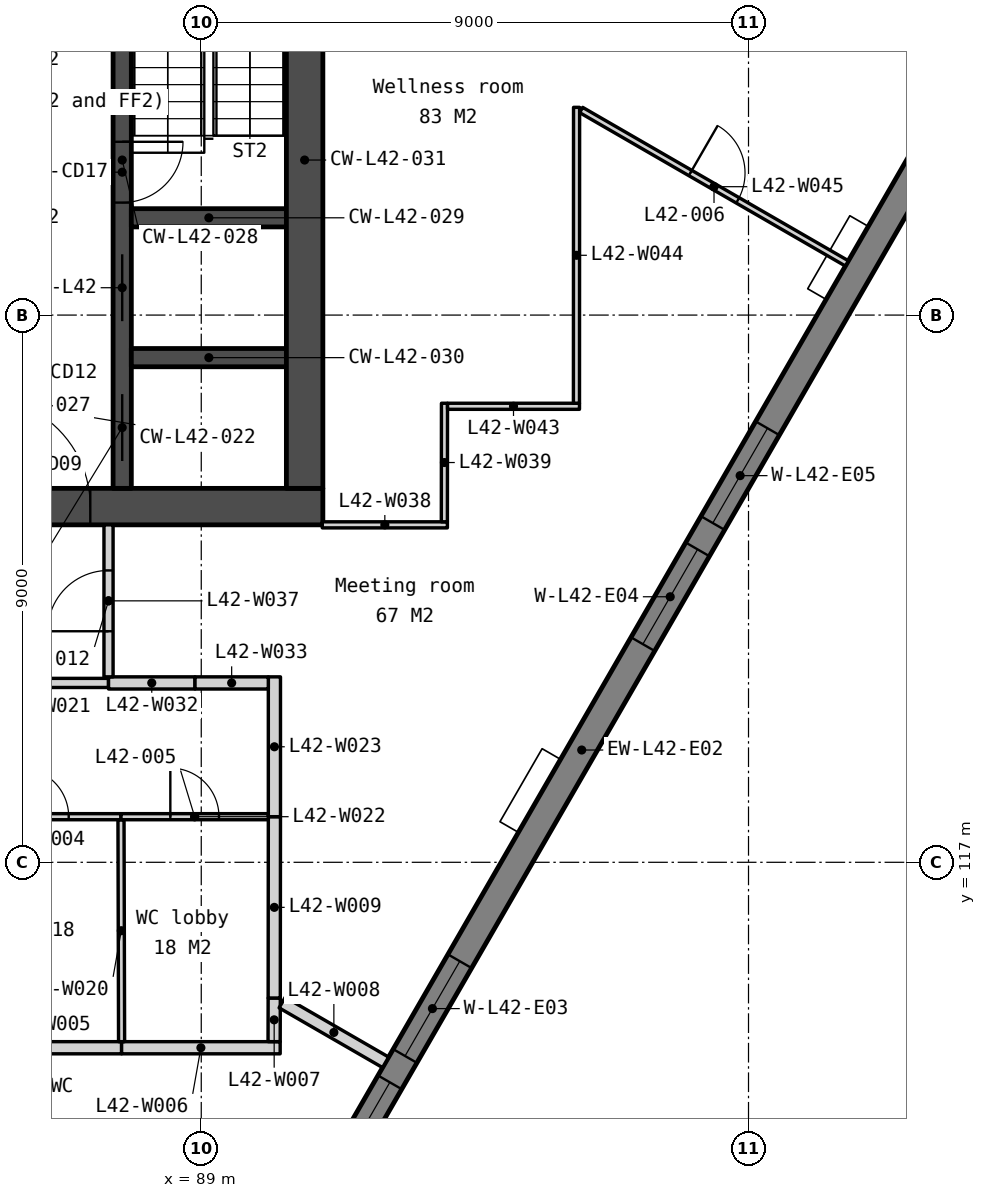
"""IFC4 building model, lengths in metres.
Left out: names, types, materials, properties, quantities, classifications, styles, units other than length and angle.
Written with IfcOpenShell. Run it as: python <this file> out.ifc"""

import sys

from ifc_helpers import new_model, si_unit, direction, frame, frame_2d, origin, place, context, subcontext, project, spatial, polyline, rectangle, outline, extrude, element, fill, save


model = new_model("IFC4")
c1 = context("Model", 3, precision=1e-05, world=origin(), true_north=direction((0.0, 1.0)))
c2 = subcontext(c1, "Body", "Model", "MODEL_VIEW")
j1 = project(units=[si_unit("LENGTHUNIT", "METRE"), si_unit("PLANEANGLEUNIT", "RADIAN")], contexts=[c1])
p1 = place(None, origin())
s1 = spatial("IfcSite", under=j1, at=p1, CompositionType="ELEMENT")
p2 = place(p1, origin())
s2 = spatial("IfcBuilding", under=s1, at=p2, CompositionType="ELEMENT")
p3 = place(p2, frame((0.0, 0.0, 167.6)))
s3 = spatial("IfcBuildingStorey", under=s2, at=p3, CompositionType="ELEMENT", Elevation=167.6)
p4 = place(p3, frame((69.0, 122.85, 0.0), z_axis=(0.0, 0.0, 1.0), x_axis=(1.0, 0.0, 0.0)))
e1 = element("IfcWall", 1, at=p4, inside=s3, PredefinedType="SOLIDWALL", context=c2, shape_type="SweptSolid", body=[
    extrude(rectangle(XDim=22.0, YDim=0.6, at=frame_2d((11.0, 0.0))), origin(), (0.0, 0.0, 1.0), 3.75),
])
p5 = place(p4, frame((16.375, 0.0, 0.0)))
e2 = element("IfcOpeningElement", 2, at=p5, cuts=e1, PredefinedType="OPENING", context=c2, shape_type="SweptSolid", body=[
    extrude(rectangle(XDim=1.8, YDim=2.1, at=frame_2d((0.9, 1.05))), frame((0.0, 0.31, 0.0), z_axis=(0.0, -1.0, 0.0), x_axis=(1.0, 0.0, 0.0)), (0.0, 0.0, 1.0), 0.62),
])
p6 = place(p4, frame((3.825, 0.0, 0.0)))
e3 = element("IfcOpeningElement", 3, at=p6, cuts=e1, PredefinedType="OPENING", context=c2, shape_type="SweptSolid", body=[
    extrude(rectangle(XDim=1.8, YDim=2.1, at=frame_2d((0.9, 1.05))), frame((0.0, 0.31, 0.0), z_axis=(0.0, -1.0, 0.0), x_axis=(1.0, 0.0, 0.0)), (0.0, 0.0, 1.0), 0.62),
])
p7 = place(p4, frame((12.85, 0.0, 0.0)))
e4 = element("IfcOpeningElement", 4, at=p7, cuts=e1, PredefinedType="OPENING", context=c2, shape_type="SweptSolid", body=[
    extrude(rectangle(XDim=1.5, YDim=2.1, at=frame_2d((0.75, 1.05))), frame((0.0, 0.31, 0.0), z_axis=(0.0, -1.0, 0.0), x_axis=(1.0, 0.0, 0.0)), (0.0, 0.0, 1.0), 0.62),
])
p8 = place(p3, frame((87.7, 133.95, 0.0), z_axis=(0.0, 0.0, 1.0), x_axis=(0.0, -1.0, 0.0)))
e5 = element("IfcWall", 5, at=p8, inside=s3, PredefinedType="SOLIDWALL", context=c2, shape_type="SweptSolid", body=[
    extrude(rectangle(XDim=10.8, YDim=0.3, at=frame_2d((5.4, 0.0))), origin(), (0.0, 0.0, 1.0), 3.75),
])
p9 = place(p8, frame((6.95, 0.0, 0.0)))
e6 = element("IfcOpeningElement", 6, at=p9, cuts=e5, PredefinedType="OPENING", context=c2, shape_type="SweptSolid", body=[
    extrude(rectangle(XDim=1.1, YDim=2.1, at=frame_2d((0.55, 1.05))), frame((0.0, 0.16, 0.0), z_axis=(0.0, -1.0, 0.0), x_axis=(1.0, 0.0, 0.0)), (0.0, 0.0, 1.0), 0.32),
])
p10 = place(p8, frame((5.1, 0.0, 0.0)))
e7 = element("IfcOpeningElement", 7, at=p10, cuts=e5, PredefinedType="OPENING", context=c2, shape_type="SweptSolid", body=[
    extrude(rectangle(XDim=1.0, YDim=2.1, at=frame_2d((0.5, 1.05))), frame((0.0, 0.16, 0.0), z_axis=(0.0, -1.0, 0.0), x_axis=(1.0, 0.0, 0.0)), (0.0, 0.0, 1.0), 0.32),
])
p11 = place(p8, frame((9.25, 0.0, 0.0)))
e8 = element("IfcOpeningElement", 8, at=p11, cuts=e5, PredefinedType="OPENING", context=c2, shape_type="SweptSolid", body=[
    extrude(rectangle(XDim=1.1, YDim=2.1, at=frame_2d((0.55, 1.05))), frame((0.0, 0.16, 0.0), z_axis=(0.0, -1.0, 0.0), x_axis=(1.0, 0.0, 0.0)), (0.0, 0.0, 1.0), 0.32),
])
for number, where, z_axis, x_axis in (
    (9, (87.85, 127.6, 0.0), (0.0, 0.0, 1.0), (1.0, 0.0, 0.0)),
    (10, (87.85, 125.3, 0.0), (0.0, 0.0, 1.0), (1.0, 0.0, 0.0)),
):
    element("IfcWall", number, at=place(p3, frame(where, z_axis=z_axis, x_axis=x_axis)), inside=s3, PredefinedType="SOLIDWALL", context=c2, shape_type="SweptSolid", body=[
        extrude(rectangle(XDim=2.55, YDim=0.3, at=frame_2d((1.275, 0.0))), origin(), (0.0, 0.0, 1.0), 3.75),
    ])
p12 = place(p3, frame((90.7, 133.95, 0.0), z_axis=(0.0, 0.0, 1.0), x_axis=(0.0, -1.0, 0.0)))
e11 = element("IfcWall", 11, at=p12, inside=s3, PredefinedType="SOLIDWALL", context=c2, shape_type="SweptSolid", body=[
    extrude(rectangle(XDim=10.8, YDim=0.6, at=frame_2d((5.4, 0.0))), origin(), (0.0, 0.0, 1.0), 3.75),
])
p13 = place(p3, frame((88.166, 106.564, -0.15), z_axis=(0.0, 0.0, 1.0), x_axis=(0.499995644604, 0.866027918359, 0.0)))
e12 = element("IfcWall", 12, at=p13, inside=s3, PredefinedType="SOLIDWALL", context=c2, shape_type="SweptSolid", body=[
    extrude(outline(polyline([(28.365, 3.9), (28.365, 0.0), (0.0, 0.0), (0.0, 3.9), (28.365, 3.9)])), frame((0.0, 0.225, 0.0), z_axis=(0.0, -1.0, 0.0), x_axis=(1.0, 0.0, 0.0)), (0.0, 0.0, 1.0), 0.45),
])
p14 = place(p13, frame((6.072, 0.0, 0.95)))
e13 = element("IfcOpeningElement", 13, at=p14, cuts=e12, PredefinedType="OPENING", context=c2, shape_type="SweptSolid", body=[
    extrude(rectangle(XDim=1.8, YDim=2.2, at=frame_2d((0.9, 1.1))), frame((0.0, 0.235, 0.0), z_axis=(0.0, -1.0, 0.0), x_axis=(1.0, 0.0, 0.0)), (0.0, 0.0, 1.0), 0.47),
])
p15 = place(p13, frame((8.372, 0.0, 0.95)))
e14 = element("IfcOpeningElement", 14, at=p15, cuts=e12, PredefinedType="OPENING", context=c2, shape_type="SweptSolid", body=[
    extrude(rectangle(XDim=1.8, YDim=2.2, at=frame_2d((0.9, 1.1))), frame((0.0, 0.235, 0.0), z_axis=(0.0, -1.0, 0.0), x_axis=(1.0, 0.0, 0.0)), (0.0, 0.0, 1.0), 0.47),
])
p16 = place(p13, frame((16.193, 0.0, 0.95)))
e15 = element("IfcOpeningElement", 15, at=p16, cuts=e12, PredefinedType="OPENING", context=c2, shape_type="SweptSolid", body=[
    extrude(rectangle(XDim=1.8, YDim=2.2, at=frame_2d((0.9, 1.1))), frame((0.0, 0.235, 0.0), z_axis=(0.0, -1.0, 0.0), x_axis=(1.0, 0.0, 0.0)), (0.0, 0.0, 1.0), 0.47),
])
p17 = place(p13, frame((18.493, 0.0, 0.95)))
e16 = element("IfcOpeningElement", 16, at=p17, cuts=e12, PredefinedType="OPENING", context=c2, shape_type="SweptSolid", body=[
    extrude(rectangle(XDim=1.8, YDim=2.2, at=frame_2d((0.9, 1.1))), frame((0.0, 0.235, 0.0), z_axis=(0.0, -1.0, 0.0), x_axis=(1.0, 0.0, 0.0)), (0.0, 0.0, 1.0), 0.47),
])
p18 = place(p13, frame((26.295, 0.0, 0.95)))
e17 = element("IfcOpeningElement", 17, at=p18, cuts=e12, PredefinedType="OPENING", context=c2, shape_type="SweptSolid", body=[
    extrude(rectangle(XDim=1.2, YDim=2.2, at=frame_2d((0.6, 1.1))), frame((0.0, 0.235, 0.0), z_axis=(0.0, -1.0, 0.0), x_axis=(1.0, 0.0, 0.0)), (0.0, 0.0, 1.0), 0.47),
])
p19 = place(p3, frame((85.15, 113.95, 0.0), z_axis=(0.0, 0.0, 1.0), x_axis=(1.0, 0.0, 0.0)))
e18 = element("IfcWall", 18, at=p19, inside=s3, PredefinedType="PARTITIONING", context=c2, shape_type="SweptSolid", body=[
    extrude(rectangle(XDim=2.54, YDim=0.2, at=frame_2d((1.27, 0.0))), origin(), (0.0, 0.0, 1.0), 3.75),
])
p20 = place(p3, frame((87.69, 113.95, 0.0), z_axis=(0.0, 0.0, 1.0), x_axis=(1.0, 0.0, 0.0)))
e19 = element("IfcWall", 19, at=p20, inside=s3, PredefinedType="PARTITIONING", context=c2, shape_type="SweptSolid", body=[
    extrude(rectangle(XDim=2.608, YDim=0.2, at=frame_2d((1.304, 0.0))), origin(), (0.0, 0.0, 1.0), 3.75),
])
p21 = place(p3, frame((90.198, 114.05, 0.0), z_axis=(0.0, 0.0, 1.0), x_axis=(0.002380945632, 0.999997165545, 0.0)))
e20 = element("IfcWall", 20, at=p21, inside=s3, PredefinedType="PARTITIONING", context=c2, shape_type="SweptSolid", body=[
    extrude(rectangle(XDim=0.718, YDim=0.2, at=frame_2d((0.359, 0.0))), origin(), (0.0, 0.0, 1.0), 3.75),
])
p22 = place(p3, frame((90.33, 114.693, 0.0), z_axis=(0.0, 0.0, 1.0), x_axis=(0.866009734793, -0.500027138508, 0.0)))
e21 = element("IfcWall", 21, at=p22, inside=s3, PredefinedType="PARTITIONING", context=c2, shape_type="SweptSolid", body=[
    extrude(rectangle(XDim=1.965, YDim=0.2, at=frame_2d((0.983, 0.0))), origin(), (0.0, 0.0, 1.0), 3.75),
])
p23 = place(p3, frame((90.2, 114.768, 0.0), z_axis=(0.0, 0.0, 1.0), x_axis=(0.000982398216, 0.999999517447, 0.0)))
e22 = element("IfcWall", 22, at=p23, inside=s3, PredefinedType="PARTITIONING", context=c2, shape_type="SweptSolid", body=[
    extrude(rectangle(XDim=2.982, YDim=0.2, at=frame_2d((1.491, 0.0))), origin(), (0.0, 0.0, 1.0), 3.75),
])
p24 = place(p3, frame((87.69, 114.05, 0.0), z_axis=(0.0, 0.0, 1.0), x_axis=(-0.002608686776, 0.999996597371, 0.0)))
e23 = element("IfcWall", 23, at=p24, inside=s3, PredefinedType="PARTITIONING", context=c2, shape_type="SweptSolid", body=[
    extrude(rectangle(XDim=3.65, YDim=0.1, at=frame_2d((1.825, 0.0))), origin(), (0.0, 0.0, 1.0), 3.75),
])
p25 = place(p3, frame((85.16, 117.75, 0.0), z_axis=(0.0, 0.0, 1.0), x_axis=(1.0, 0.0, 0.0)))
e24 = element("IfcWall", 24, at=p25, inside=s3, PredefinedType="PARTITIONING", context=c2, shape_type="SweptSolid", body=[
    extrude(rectangle(XDim=2.52, YDim=0.1, at=frame_2d((1.26, 0.0))), origin(), (0.0, 0.0, 1.0), 3.75),
])
p26 = place(p25, frame((0.86, 0.0, 0.0)))
e25 = element("IfcOpeningElement", 25, at=p26, cuts=e24, PredefinedType="OPENING", context=c2, shape_type="SweptSolid", body=[
    extrude(rectangle(XDim=0.8, YDim=2.1, at=frame_2d((0.4, 1.05))), frame((0.0, 0.06, 0.0), z_axis=(0.0, -1.0, 0.0), x_axis=(1.0, 0.0, 0.0)), (0.0, 0.0, 1.0), 0.12),
])
p27 = place(p3, frame((87.68, 117.75, 0.0), z_axis=(0.0, 0.0, 1.0), x_axis=(1.0, 0.0, 0.0)))
e26 = element("IfcWall", 26, at=p27, inside=s3, PredefinedType="PARTITIONING", context=c2, shape_type="SweptSolid", body=[
    extrude(rectangle(XDim=2.423, YDim=0.1, at=frame_2d((1.211, 0.0))), origin(), (0.0, 0.0, 1.0), 3.75),
])
p28 = place(p27, frame((0.812, 0.0, 0.0)))
e27 = element("IfcOpeningElement", 27, at=p28, cuts=e26, PredefinedType="OPENING", context=c2, shape_type="SweptSolid", body=[
    extrude(rectangle(XDim=0.8, YDim=2.1, at=frame_2d((0.4, 1.05))), frame((0.0, 0.06, 0.0), z_axis=(0.0, -1.0, 0.0), x_axis=(1.0, 0.0, 0.0)), (0.0, 0.0, 1.0), 0.12),
])
p29 = place(p3, frame((90.203, 117.75, 0.0), z_axis=(0.0, 0.0, 1.0), x_axis=(0.0, 1.0, 0.0)))
e28 = element("IfcWall", 28, at=p29, inside=s3, PredefinedType="PARTITIONING", context=c2, shape_type="SweptSolid", body=[
    extrude(rectangle(XDim=2.3, YDim=0.2, at=frame_2d((1.15, 0.0))), origin(), (0.0, 0.0, 1.0), 3.75),
])
p30 = place(p3, frame((81.275, 119.95, 0.0), z_axis=(0.0, 0.0, 1.0), x_axis=(1.0, 0.0, 0.0)))
e29 = element("IfcWall", 29, at=p30, inside=s3, PredefinedType="PARTITIONING", context=c2, shape_type="SweptSolid", body=[
    extrude(rectangle(XDim=6.2, YDim=0.15, at=frame_2d((3.1, 0.0))), origin(), (0.0, 0.0, 1.0), 3.75),
])
p31 = place(p30, frame((2.6, 0.0, 0.0)))
e30 = element("IfcOpeningElement", 30, at=p31, cuts=e29, PredefinedType="OPENING", context=c2, shape_type="SweptSolid", body=[
    extrude(rectangle(XDim=1.0, YDim=2.1, at=frame_2d((0.5, 1.05))), frame((0.0, 0.085, 0.0), z_axis=(0.0, -1.0, 0.0), x_axis=(1.0, 0.0, 0.0)), (0.0, 0.0, 1.0), 0.17),
])
p32 = place(p3, frame((87.475, 119.95, 0.0), z_axis=(0.0, 0.0, 1.0), x_axis=(1.0, 0.0, 0.0)))
e31 = element("IfcWall", 31, at=p32, inside=s3, PredefinedType="PARTITIONING", context=c2, shape_type="SweptSolid", body=[
    extrude(rectangle(XDim=1.422, YDim=0.2, at=frame_2d((0.711, 0.0))), origin(), (0.0, 0.0, 1.0), 3.75),
])
p33 = place(p3, frame((88.897, 119.95, 0.0), z_axis=(0.0, 0.0, 1.0), x_axis=(1.0, 0.0, 0.0)))
e32 = element("IfcWall", 32, at=p33, inside=s3, PredefinedType="PARTITIONING", context=c2, shape_type="SweptSolid", body=[
    extrude(rectangle(XDim=1.206, YDim=0.2, at=frame_2d((0.603, 0.0))), origin(), (0.0, 0.0, 1.0), 3.75),
])
p34 = place(p3, frame((87.475, 120.05, 0.0), z_axis=(0.0, 0.0, 1.0), x_axis=(0.0, 1.0, 0.0)))
e33 = element("IfcWall", 33, at=p34, inside=s3, PredefinedType="PARTITIONING", context=c2, shape_type="SweptSolid", body=[
    extrude(rectangle(XDim=2.5, YDim=0.15, at=frame_2d((1.25, 0.0))), origin(), (0.0, 0.0, 1.0), 3.75),
])
p35 = place(p34, frame((0.75, 0.0, 0.0)))
e34 = element("IfcOpeningElement", 34, at=p35, cuts=e33, PredefinedType="OPENING", context=c2, shape_type="SweptSolid", body=[
    extrude(rectangle(XDim=1.0, YDim=2.1, at=frame_2d((0.5, 1.05))), frame((0.0, 0.085, 0.0), z_axis=(0.0, -1.0, 0.0), x_axis=(1.0, 0.0, 0.0)), (0.0, 0.0, 1.0), 0.17),
])
p36 = place(p3, frame((90.99, 122.55, 0.0), z_axis=(0.0, 0.0, 1.0), x_axis=(1.0, 0.0, 0.0)))
e35 = element("IfcWall", 35, at=p36, inside=s3, PredefinedType="PARTITIONING", context=c2, shape_type="SweptSolid", body=[
    extrude(rectangle(XDim=2.058, YDim=0.1, at=frame_2d((1.029, 0.0))), origin(), (0.0, 0.0, 1.0), 3.75),
])
p37 = place(p3, frame((92.998, 122.6, 0.0), z_axis=(0.0, 0.0, 1.0), x_axis=(0.001001752565, 0.999999498246, 0.0)))
e36 = element("IfcWall", 36, at=p37, inside=s3, PredefinedType="PARTITIONING", context=c2, shape_type="SweptSolid", body=[
    extrude(rectangle(XDim=1.95, YDim=0.1, at=frame_2d((0.975, 0.0))), origin(), (0.0, 0.0, 1.0), 3.75),
])
p38 = place(p3, frame((93.05, 124.5, 0.0), z_axis=(0.0, 0.0, 1.0), x_axis=(1.0, 0.0, 0.0)))
e37 = element("IfcWall", 37, at=p38, inside=s3, PredefinedType="PARTITIONING", context=c2, shape_type="SweptSolid", body=[
    extrude(rectangle(XDim=2.17, YDim=0.1, at=frame_2d((1.085, 0.0))), origin(), (0.0, 0.0, 1.0), 3.75),
])
p39 = place(p3, frame((95.17, 124.55, 0.0), z_axis=(0.0, 0.0, 1.0), x_axis=(0.000401344472, 0.999999919461, 0.0)))
e38 = element("IfcWall", 38, at=p39, inside=s3, PredefinedType="PARTITIONING", context=c2, shape_type="SweptSolid", body=[
    extrude(rectangle(XDim=4.866, YDim=0.1, at=frame_2d((2.433, 0.0))), origin(), (0.0, 0.0, 1.0), 3.75),
])
p40 = place(p3, frame((95.247, 129.373, 0.0), z_axis=(0.0, 0.0, 1.0), x_axis=(0.866040580427, -0.499973712363, 0.0)))
e39 = element("IfcWall", 39, at=p40, inside=s3, PredefinedType="PARTITIONING", context=c2, shape_type="SweptSolid", body=[
    extrude(rectangle(XDim=5.047, YDim=0.1, at=frame_2d((2.523, 0.0))), origin(), (0.0, 0.0, 1.0), 3.75),
])
p41 = place(p40, frame((2.073, 0.0, 0.0)))
e40 = element("IfcOpeningElement", 40, at=p41, cuts=e39, PredefinedType="OPENING", context=c2, shape_type="SweptSolid", body=[
    extrude(rectangle(XDim=0.9, YDim=2.1, at=frame_2d((0.45, 1.05))), frame((0.0, 0.06, 0.0), z_axis=(0.0, -1.0, 0.0), x_axis=(1.0, 0.0, 0.0)), (0.0, 0.0, 1.0), 0.12),
])
p42 = place(p9, origin())
e41 = element("IfcDoor", 41, at=p42, inside=s3, OperationType="SLIDING_TO_LEFT", PredefinedType="DOOR", context=c2, shape_type="SweptSolid", body=[
    extrude(rectangle(XDim=1.1, YDim=2.1, at=frame_2d((0.55, 1.05))), frame((0.0, 0.025, 0.0), z_axis=(0.0, -1.0, 0.0), x_axis=(1.0, 0.0, 0.0)), (0.0, 0.0, 1.0), 0.05),
])
fill(e6, e41)
p43 = place(p5, origin())
e42 = element("IfcDoor", 42, at=p43, inside=s3, OperationType="DOUBLE_DOOR_DOUBLE_SWING", PredefinedType="DOOR", context=c2, shape_type="SweptSolid", body=[
    extrude(rectangle(XDim=1.8, YDim=2.1, at=frame_2d((0.9, 1.05))), frame((0.0, 0.025, 0.0), z_axis=(0.0, -1.0, 0.0), x_axis=(1.0, 0.0, 0.0)), (0.0, 0.0, 1.0), 0.05),
])
fill(e2, e42)
p44 = place(p10, origin())
e43 = element("IfcDoor", 43, at=p44, inside=s3, OperationType="SINGLE_SWING_LEFT", PredefinedType="DOOR", context=c2, shape_type="SweptSolid", body=[
    extrude(rectangle(XDim=1.0, YDim=2.1, at=frame_2d((0.5, 1.05))), frame((0.0, 0.025, 0.0), z_axis=(0.0, -1.0, 0.0), x_axis=(1.0, 0.0, 0.0)), (0.0, 0.0, 1.0), 0.05),
])
fill(e7, e43)
p45 = place(p11, origin())
e44 = element("IfcDoor", 44, at=p45, inside=s3, OperationType="SLIDING_TO_LEFT", PredefinedType="DOOR", context=c2, shape_type="SweptSolid", body=[
    extrude(rectangle(XDim=1.1, YDim=2.1, at=frame_2d((0.55, 1.05))), frame((0.0, 0.025, 0.0), z_axis=(0.0, -1.0, 0.0), x_axis=(1.0, 0.0, 0.0)), (0.0, 0.0, 1.0), 0.05),
])
fill(e8, e44)
p46 = place(p14, origin())
e45 = element("IfcWindow", 45, at=p46, inside=s3, PartitioningType="SINGLE_PANEL", PredefinedType="WINDOW", context=c2, shape_type="SweptSolid", body=[
    extrude(rectangle(XDim=1.8, YDim=2.2, at=frame_2d((0.9, 1.1))), frame((0.0, 0.03, 0.0), z_axis=(0.0, -1.0, 0.0), x_axis=(1.0, 0.0, 0.0)), (0.0, 0.0, 1.0), 0.06),
])
fill(e13, e45)
p47 = place(p15, origin())
e46 = element("IfcWindow", 46, at=p47, inside=s3, PartitioningType="SINGLE_PANEL", PredefinedType="WINDOW", context=c2, shape_type="SweptSolid", body=[
    extrude(rectangle(XDim=1.8, YDim=2.2, at=frame_2d((0.9, 1.1))), frame((0.0, 0.03, 0.0), z_axis=(0.0, -1.0, 0.0), x_axis=(1.0, 0.0, 0.0)), (0.0, 0.0, 1.0), 0.06),
])
fill(e14, e46)
p48 = place(p16, origin())
e47 = element("IfcWindow", 47, at=p48, inside=s3, PartitioningType="SINGLE_PANEL", PredefinedType="WINDOW", context=c2, shape_type="SweptSolid", body=[
    extrude(rectangle(XDim=1.8, YDim=2.2, at=frame_2d((0.9, 1.1))), frame((0.0, 0.03, 0.0), z_axis=(0.0, -1.0, 0.0), x_axis=(1.0, 0.0, 0.0)), (0.0, 0.0, 1.0), 0.06),
])
fill(e15, e47)
p49 = place(p17, origin())
e48 = element("IfcWindow", 48, at=p49, inside=s3, PartitioningType="SINGLE_PANEL", PredefinedType="WINDOW", context=c2, shape_type="SweptSolid", body=[
    extrude(rectangle(XDim=1.8, YDim=2.2, at=frame_2d((0.9, 1.1))), frame((0.0, 0.03, 0.0), z_axis=(0.0, -1.0, 0.0), x_axis=(1.0, 0.0, 0.0)), (0.0, 0.0, 1.0), 0.06),
])
fill(e16, e48)
p50 = place(p26, origin())
e49 = element("IfcDoor", 49, at=p50, inside=s3, OperationType="SINGLE_SWING_LEFT", PredefinedType="DOOR", context=c2, shape_type="SweptSolid", body=[
    extrude(rectangle(XDim=0.8, YDim=2.1, at=frame_2d((0.4, 1.05))), frame((0.0, 0.025, 0.0), z_axis=(0.0, -1.0, 0.0), x_axis=(1.0, 0.0, 0.0)), (0.0, 0.0, 1.0), 0.05),
])
fill(e25, e49)
p51 = place(p28, origin())
e50 = element("IfcDoor", 50, at=p51, inside=s3, OperationType="SINGLE_SWING_LEFT", PredefinedType="DOOR", context=c2, shape_type="SweptSolid", body=[
    extrude(rectangle(XDim=0.8, YDim=2.1, at=frame_2d((0.4, 1.05))), frame((0.0, 0.025, 0.0), z_axis=(0.0, -1.0, 0.0), x_axis=(1.0, 0.0, 0.0)), (0.0, 0.0, 1.0), 0.05),
])
fill(e27, e50)
p52 = place(p41, origin())
e51 = element("IfcDoor", 51, at=p52, inside=s3, OperationType="SINGLE_SWING_LEFT", PredefinedType="DOOR", context=c2, shape_type="SweptSolid", body=[
    extrude(rectangle(XDim=0.9, YDim=2.1, at=frame_2d((0.45, 1.05))), frame((0.0, 0.025, 0.0), z_axis=(0.0, -1.0, 0.0), x_axis=(1.0, 0.0, 0.0)), (0.0, 0.0, 1.0), 0.05),
])
fill(e40, e51)
p53 = place(p35, origin())
e52 = element("IfcDoor", 52, at=p53, inside=s3, OperationType="SINGLE_SWING_LEFT", PredefinedType="DOOR", context=c2, shape_type="SweptSolid", body=[
    extrude(rectangle(XDim=1.0, YDim=2.1, at=frame_2d((0.5, 1.05))), frame((0.0, 0.025, 0.0), z_axis=(0.0, -1.0, 0.0), x_axis=(1.0, 0.0, 0.0)), (0.0, 0.0, 1.0), 0.05),
])
fill(e34, e52)
save(model, sys.argv[1])
